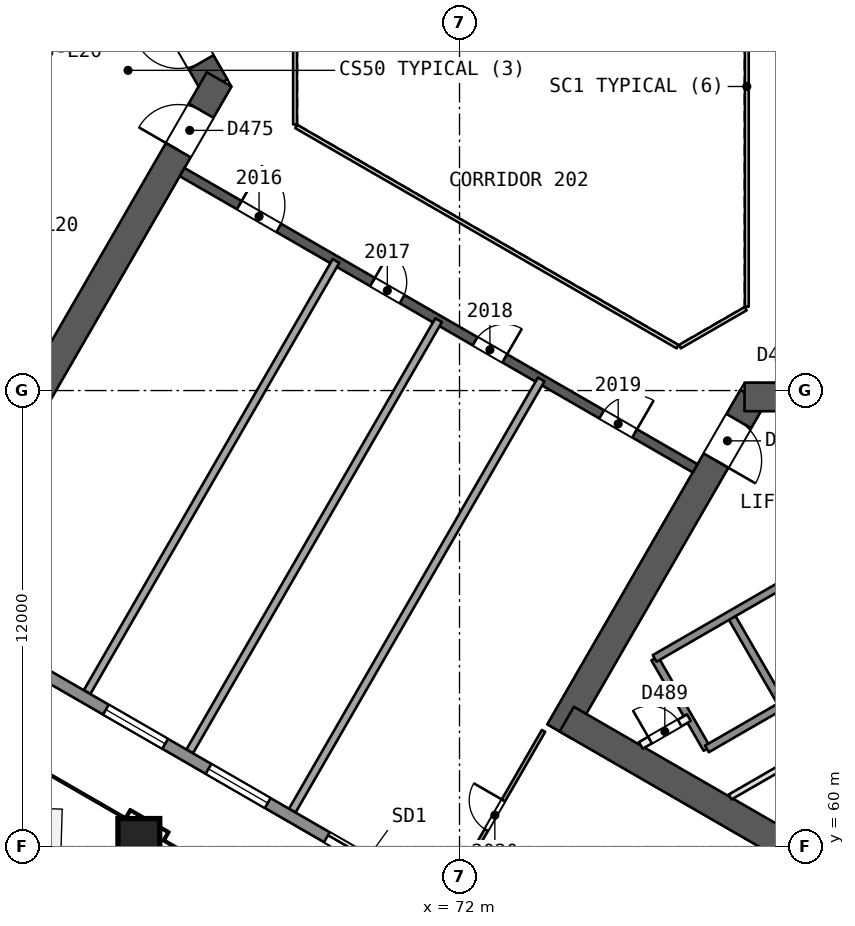
"""IFC4 building model, lengths in metres.
Left out: names, types, materials, properties, quantities, classifications, styles, units other than length and angle.
Written with IfcOpenShell. Run it as: python <this file> out.ifc"""

import sys

from ifc_helpers import new_model, si_unit, direction, frame, frame_2d, origin, origin_2d, place, context, subcontext, project, spatial, rectangle, extrude, element, fill, save


model = new_model("IFC4")
c1 = context("Model", 3, precision=1e-05, world=origin(), true_north=direction((0.0, 1.0)))
c2 = subcontext(c1, "Body", "Model", "MODEL_VIEW")
j1 = project(units=[si_unit("LENGTHUNIT", "METRE"), si_unit("PLANEANGLEUNIT", "RADIAN")], contexts=[c1])
p1 = place(None, origin())
s1 = spatial("IfcSite", under=j1, at=p1, CompositionType="ELEMENT")
p2 = place(p1, origin())
s2 = spatial("IfcBuilding", under=s1, at=p2, CompositionType="ELEMENT")
p3 = place(p2, frame((0.0, 0.0, 86.9)))
s3 = spatial("IfcBuildingStorey", under=s2, at=p3, CompositionType="ELEMENT", Elevation=86.9)
p4 = place(p3, frame((65.567, 80.0, 0.0), z_axis=(0.0, 0.0, 1.0), x_axis=(-0.499988615364, 0.866031976607, 0.0)))
e1 = element("IfcWall", 1, at=p4, inside=s3, PredefinedType="SHEAR", context=c2, shape_type="SweptSolid", body=[
    extrude(rectangle(XDim=10.163, YDim=0.75, at=frame_2d((5.082, 0.0))), origin(), (0.0, 0.0, 1.0), 3.7),
])
p5 = place(p4, frame((0.733, 0.0, 0.0)))
e2 = element("IfcOpeningElement", 2, at=p5, cuts=e1, PredefinedType="OPENING", context=c2, shape_type="SweptSolid", body=[
    extrude(rectangle(XDim=1.2, YDim=2.1, at=frame_2d((0.6, 1.05))), frame((0.0, 0.385, 0.0), z_axis=(0.0, -1.0, 0.0), x_axis=(1.0, 0.0, 0.0)), (0.0, 0.0, 1.0), 0.771),
])
p6 = place(p3, frame((60.673, 71.523, 0.0), z_axis=(0.0, 0.0, 1.0), x_axis=(0.499997052475, 0.866027105532, 0.0)))
e3 = element("IfcWall", 3, at=p6, inside=s3, PredefinedType="SHEAR", context=c2, shape_type="SweptSolid", body=[
    extrude(rectangle(XDim=10.005, YDim=0.75, at=frame_2d((5.002, 0.0))), origin(), (0.0, 0.0, 1.0), 3.7),
])
p7 = place(p6, frame((7.855, 0.0, 0.0)))
e4 = element("IfcOpeningElement", 4, at=p7, cuts=e3, PredefinedType="OPENING", context=c2, shape_type="SweptSolid", body=[
    extrude(rectangle(XDim=1.2, YDim=2.1, at=frame_2d((0.6, 1.05))), frame((0.0, 0.385, 0.0), z_axis=(0.0, -1.0, 0.0), x_axis=(1.0, 0.0, 0.0)), (0.0, 0.0, 1.0), 0.771),
])
p8 = place(p3, frame((79.717, 71.831, 0.0), z_axis=(0.0, 0.0, 1.0), x_axis=(-0.499996230114, -0.866027580318, 0.0)))
e5 = element("IfcWall", 5, at=p8, inside=s3, PredefinedType="SHEAR", context=c2, shape_type="SweptSolid", body=[
    extrude(rectangle(XDim=10.164, YDim=0.75, at=frame_2d((5.082, 0.0))), origin(), (0.0, 0.0, 1.0), 3.7),
])
p9 = place(p8, frame((0.733, 0.0, 0.0)))
e6 = element("IfcOpeningElement", 6, at=p9, cuts=e5, PredefinedType="OPENING", context=c2, shape_type="SweptSolid", body=[
    extrude(rectangle(XDim=1.2, YDim=2.1, at=frame_2d((0.6, 1.05))), frame((0.0, 0.385, 0.0), z_axis=(0.0, -1.0, 0.0), x_axis=(1.0, 0.0, 0.0)), (0.0, 0.0, 1.0), 0.771),
])
p10 = place(p3, frame((74.822, 63.354, 0.0), z_axis=(0.0, 0.0, 1.0), x_axis=(0.8660248072, -0.500001033313, 0.0)))
e7 = element("IfcWall", 7, at=p10, inside=s3, PredefinedType="SHEAR", context=c2, shape_type="SweptSolid", body=[
    extrude(rectangle(XDim=13.958, YDim=0.75, at=frame_2d((6.979, 0.0))), origin(), (0.0, 0.0, 1.0), 3.7),
])
p11 = place(p3, frame((89.505, 71.831, 0.0), z_axis=(0.0, 0.0, 1.0), x_axis=(-1.0, 0.0, 0.0)))
e8 = element("IfcWall", 8, at=p11, inside=s3, PredefinedType="SHEAR", context=c2, shape_type="SweptSolid", body=[
    extrude(rectangle(XDim=10.005, YDim=0.75, at=frame_2d((5.002, 0.0))), origin(), (0.0, 0.0, 1.0), 3.7),
])
p12 = place(p11, frame((7.855, 0.0, 0.0)))
e9 = element("IfcOpeningElement", 9, at=p12, cuts=e8, PredefinedType="OPENING", context=c2, shape_type="SweptSolid", body=[
    extrude(rectangle(XDim=1.2, YDim=2.1, at=frame_2d((0.6, 1.05))), frame((0.0, 0.385, 0.0), z_axis=(0.0, -1.0, 0.0), x_axis=(1.0, 0.0, 0.0)), (0.0, 0.0, 1.0), 0.771),
])
p13 = place(p3, frame((64.7, 77.748, 0.0), z_axis=(0.0, 0.0, 1.0), x_axis=(0.866026492143, -0.499998114903, 0.0)))
e10 = element("IfcWall", 10, at=p13, inside=s3, PredefinedType="SHEAR", context=c2, shape_type="SweptSolid", body=[
    extrude(rectangle(XDim=15.588, YDim=0.25, at=frame_2d((7.794, 0.0))), origin(), (0.0, 0.0, 1.0), 3.2),
])
p14 = place(p13, frame((1.738, 0.0, 0.0)))
e11 = element("IfcOpeningElement", 11, at=p14, cuts=e10, PredefinedType="OPENING", context=c2, shape_type="SweptSolid", body=[
    extrude(rectangle(XDim=1.2, YDim=2.4, at=frame_2d((0.6, 1.2))), frame((0.0, 0.135, 0.0), z_axis=(0.0, -1.0, 0.0), x_axis=(1.0, 0.0, 0.0)), (0.0, 0.0, 1.0), 0.271),
])
p15 = place(p13, frame((5.785, 0.0, 0.0)))
e12 = element("IfcOpeningElement", 12, at=p15, cuts=e10, PredefinedType="OPENING", context=c2, shape_type="SweptSolid", body=[
    extrude(rectangle(XDim=0.9, YDim=2.1, at=frame_2d((0.45, 1.05))), frame((0.0, 0.135, 0.0), z_axis=(0.0, -1.0, 0.0), x_axis=(1.0, 0.0, 0.0)), (0.0, 0.0, 1.0), 0.271),
])
p16 = place(p13, frame((8.903, 0.0, 0.0)))
e13 = element("IfcOpeningElement", 13, at=p16, cuts=e10, PredefinedType="OPENING", context=c2, shape_type="SweptSolid", body=[
    extrude(rectangle(XDim=0.9, YDim=2.1, at=frame_2d((0.45, 1.05))), frame((0.0, 0.135, 0.0), z_axis=(0.0, -1.0, 0.0), x_axis=(1.0, 0.0, 0.0)), (0.0, 0.0, 1.0), 0.271),
])
p17 = place(p13, frame((12.75, 0.0, 0.0)))
e14 = element("IfcOpeningElement", 14, at=p17, cuts=e10, PredefinedType="OPENING", context=c2, shape_type="SweptSolid", body=[
    extrude(rectangle(XDim=1.0, YDim=2.1, at=frame_2d((0.5, 1.05))), frame((0.0, 0.135, 0.0), z_axis=(0.0, -1.0, 0.0), x_axis=(1.0, 0.0, 0.0)), (0.0, 0.0, 1.0), 0.271),
])
p18 = place(p3, frame((63.549, 60.167, 0.0), z_axis=(0.010092954999, 0.017481261926, 0.999796248113), x_axis=(-0.499912939919, -0.865840395363, 0.020185694417)))
e15 = element("IfcColumn", 15, at=p18, inside=s3, PredefinedType="COLUMN", context=c2, shape_type="SweptSolid", body=[
    extrude(rectangle(XDim=1.1, YDim=1.1, at=origin_2d()), origin(), (0.0, 0.0, 1.0), 3.701),
])
for number, where, z_axis, x_axis in (
    (16, (62.199, 64.063, 0.0), (0.0, 0.0, 1.0), (0.5, 0.866, 0.0)),
    (17, (64.899, 62.504, 0.0), (0.0, 0.0, 1.0), (0.5, 0.866, 0.0)),
    (18, (67.599, 60.946, 0.0), (0.0, 0.0, 1.0), (0.5, 0.866, 0.0)),
):
    element("IfcWall", number, at=place(p3, frame(where, z_axis=z_axis, x_axis=x_axis)), inside=s3, PredefinedType="PARTITIONING", context=c2, shape_type="SweptSolid", body=[
        extrude(rectangle(XDim=13.102, YDim=0.2, at=frame_2d((6.551, 0.0))), origin(), (0.0, 0.0, 1.0), 3.2),
    ])
p19 = place(p3, frame((71.649, 58.607, 0.0), z_axis=(0.0, 0.0, 1.0), x_axis=(0.499972702148, 0.866041163633, 0.0)))
e19 = element("IfcWall", 19, at=p19, inside=s3, PredefinedType="PARTITIONING", context=c2, shape_type="SweptSolid", body=[
    extrude(rectangle(XDim=5.123, YDim=0.1, at=frame_2d((2.562, 0.0))), origin(), (0.0, 0.0, 1.0), 3.2),
])
p20 = place(p19, frame((2.112, 0.0, 0.0)))
e20 = element("IfcOpeningElement", 20, at=p20, cuts=e19, PredefinedType="OPENING", context=c2, shape_type="SweptSolid", body=[
    extrude(rectangle(XDim=0.9, YDim=2.1, at=frame_2d((0.45, 1.05))), frame((0.0, 0.061, 0.0), z_axis=(0.0, -1.0, 0.0), x_axis=(1.0, 0.0, 0.0)), (0.0, 0.0, 1.0), 0.121),
])
p21 = place(p3, frame((90.165, 47.745, 0.0), z_axis=(0.0, 0.0, 1.0), x_axis=(-0.866025940441, 0.499999070483, 0.0)))
e21 = element("IfcWall", 21, at=p21, inside=s3, PredefinedType="SOLIDWALL", context=c2, shape_type="SweptSolid", body=[
    extrude(rectangle(XDim=58.522, YDim=0.3, at=frame_2d((29.261, 0.0))), origin(), (0.0, 0.0, 1.0), 3.2),
])
p22 = place(p21, frame((44.294, 0.0, 0.0)))
e22 = element("IfcOpeningElement", 22, at=p22, cuts=e21, PredefinedType="OPENING", context=c2, shape_type="SweptSolid", body=[
    extrude(rectangle(XDim=2.4, YDim=2.4, at=frame_2d((1.2, 1.2))), frame((0.0, 0.161, 0.0), z_axis=(0.0, -1.0, 0.0), x_axis=(1.0, 0.0, 0.0)), (0.0, 0.0, 1.0), 0.321),
])
p23 = place(p21, frame((22.605, 0.0, 0.0)))
e23 = element("IfcOpeningElement", 23, at=p23, cuts=e21, PredefinedType="OPENING", context=c2, shape_type="SweptSolid", body=[
    extrude(rectangle(XDim=2.4, YDim=2.4, at=frame_2d((1.2, 1.2))), frame((0.0, 0.161, 0.0), z_axis=(0.0, -1.0, 0.0), x_axis=(1.0, 0.0, 0.0)), (0.0, 0.0, 1.0), 0.321),
])
p24 = place(p21, frame((10.658, 0.0, 0.0)))
e24 = element("IfcOpeningElement", 24, at=p24, cuts=e21, PredefinedType="OPENING", context=c2, shape_type="SweptSolid", body=[
    extrude(rectangle(XDim=2.4, YDim=2.4, at=frame_2d((1.2, 1.2))), frame((0.0, 0.161, 0.0), z_axis=(0.0, -1.0, 0.0), x_axis=(1.0, 0.0, 0.0)), (0.0, 0.0, 1.0), 0.321),
])
p25 = place(p21, frame((29.92, 0.0, 0.9)))
e25 = element("IfcOpeningElement", 25, at=p25, cuts=e21, PredefinedType="OPENING", context=c2, shape_type="SweptSolid", body=[
    extrude(rectangle(XDim=1.8, YDim=1.5, at=frame_2d((0.9, 0.75))), frame((0.0, 0.161, 0.0), z_axis=(0.0, -1.0, 0.0), x_axis=(1.0, 0.0, 0.0)), (0.0, 0.0, 1.0), 0.321),
])
p26 = place(p21, frame((26.802, 0.0, 0.9)))
e26 = element("IfcOpeningElement", 26, at=p26, cuts=e21, PredefinedType="OPENING", context=c2, shape_type="SweptSolid", body=[
    extrude(rectangle(XDim=1.8, YDim=1.5, at=frame_2d((0.9, 0.75))), frame((0.0, 0.161, 0.0), z_axis=(0.0, -1.0, 0.0), x_axis=(1.0, 0.0, 0.0)), (0.0, 0.0, 1.0), 0.321),
])
for number, where, z_axis, x_axis in (
    (27, (77.135, 64.952, 0.0), (0.0, 0.0, 1.0), (0.5, -0.866, 0.0)),
    (28, (79.127, 66.102, 0.0), (0.0, 0.0, 1.0), (0.5, -0.866, 0.0)),
):
    element("IfcWall", number, at=place(p3, frame(where, z_axis=z_axis, x_axis=x_axis)), inside=s3, PredefinedType="SOLIDWALL", context=c2, shape_type="SweptSolid", body=[
        extrude(rectangle(XDim=2.75, YDim=0.2, at=frame_2d((1.375, 0.0))), origin(), (0.0, 0.0, 1.0), 3.2),
    ])
p27 = place(p3, frame((77.135, 64.952, 0.0), z_axis=(0.0, 0.0, 1.0), x_axis=(0.866031916153, 0.499988720078, 0.0)))
e29 = element("IfcWall", 29, at=p27, inside=s3, PredefinedType="SOLIDWALL", context=c2, shape_type="SweptSolid", body=[
    extrude(rectangle(XDim=11.35, YDim=0.2, at=frame_2d((5.675, 0.0))), origin(), (0.0, 0.0, 1.0), 3.2),
])
p28 = place(p3, frame((76.77, 62.662, 0.0), z_axis=(0.0, 0.0, 1.0), x_axis=(0.866054810376, 0.49994906283, 0.0)))
e30 = element("IfcWall", 30, at=p28, inside=s3, PredefinedType="PARTITIONING", context=c2, shape_type="SweptSolid", body=[
    extrude(rectangle(XDim=1.461, YDim=0.2, at=frame_2d((0.73, 0.0))), origin(), (0.0, 0.0, 1.0), 3.2),
])
p29 = place(p28, frame((0.281, 0.0, 0.0)))
e31 = element("IfcOpeningElement", 31, at=p29, cuts=e30, PredefinedType="OPENING", context=c2, shape_type="SweptSolid", body=[
    extrude(rectangle(XDim=0.9, YDim=2.1, at=frame_2d((0.45, 1.05))), frame((0.0, 0.11, 0.0), z_axis=(0.0, -1.0, 0.0), x_axis=(1.0, 0.0, 0.0)), (0.0, 0.0, 1.0), 0.221),
])
p30 = place(p3, frame((80.367, 63.954, 0.0), z_axis=(0.0, 0.0, 1.0), x_axis=(0.866026575979, 0.499997969693, 0.0)))
e32 = element("IfcWall", 32, at=p30, inside=s3, PredefinedType="SOLIDWALL", context=c2, shape_type="SweptSolid", body=[
    extrude(rectangle(XDim=6.75, YDim=0.2, at=frame_2d((3.375, 0.0))), origin(), (0.0, 0.0, 1.0), 3.2),
])
p31 = place(p3, frame((78.51, 62.57, 0.0), z_axis=(0.0, 0.0, 1.0), x_axis=(0.866053019151, 0.499952165731, 0.0)))
e33 = element("IfcWall", 33, at=p31, inside=s3, PredefinedType="SOLIDWALL", context=c2, shape_type="SweptSolid", body=[
    extrude(rectangle(XDim=2.3, YDim=0.2, at=frame_2d((1.15, 0.0))), origin(), (0.0, 0.0, 1.0), 3.2),
])
p32 = place(p3, frame((79.12, 61.305, 0.0), z_axis=(0.0, 0.0, 1.0), x_axis=(0.866046471269, 0.499963508271, 0.0)))
e34 = element("IfcWall", 34, at=p32, inside=s3, PredefinedType="PARTITIONING", context=c2, shape_type="SweptSolid", body=[
    extrude(rectangle(XDim=2.28, YDim=0.15, at=frame_2d((1.14, 0.0))), origin(), (0.0, 0.0, 1.0), 3.2),
])
p33 = place(p3, frame((79.56, 74.206, 0.0), z_axis=(0.0, 0.0, 1.0), x_axis=(0.0, 1.0, 0.0)))
e35 = element("IfcWall", 35, at=p33, inside=s3, PredefinedType="PARTITIONING", context=c2, shape_type="SweptSolid", body=[
    extrude(rectangle(XDim=11.588, YDim=0.1, at=frame_2d((5.794, 0.0))), origin(), (0.0, 0.0, 1.0), 3.2),
])
p34 = place(p3, frame((67.672, 81.0, 0.0), z_axis=(0.0, 0.0, 1.0), x_axis=(0.0, -1.0, 0.0)))
e36 = element("IfcWall", 36, at=p34, inside=s3, PredefinedType="PARTITIONING", context=c2, shape_type="SweptSolid", body=[
    extrude(rectangle(XDim=2.0, YDim=0.1, at=frame_2d((1.0, 0.0))), origin(), (0.0, 0.0, 1.0), 3.2),
])
p35 = place(p3, frame((67.702, 78.948, 0.0), z_axis=(0.0, 0.0, 1.0), x_axis=(0.866026658274, -0.499997827154, 0.0)))
e37 = element("IfcWall", 37, at=p35, inside=s3, PredefinedType="PARTITIONING", context=c2, shape_type="SweptSolid", body=[
    extrude(rectangle(XDim=11.588, YDim=0.1, at=frame_2d((5.794, 0.0))), origin(), (0.0, 0.0, 1.0), 3.2),
])
p36 = place(p3, frame((77.798, 73.154, 0.0), z_axis=(0.0, 0.0, 1.0), x_axis=(0.866041268327, 0.499972520799, 0.0)))
e38 = element("IfcWall", 38, at=p36, inside=s3, PredefinedType="PARTITIONING", context=c2, shape_type="SweptSolid", body=[
    extrude(rectangle(XDim=2.0, YDim=0.1, at=frame_2d((1.0, 0.0))), origin(), (0.0, 0.0, 1.0), 3.2),
])
p37 = place(p14, origin())
e39 = element("IfcDoor", 39, at=p37, inside=s3, OperationType="SINGLE_SWING_LEFT", PredefinedType="NOTDEFINED", context=c2, shape_type="SweptSolid", body=[
    extrude(rectangle(XDim=1.2, YDim=2.4, at=frame_2d((0.6, 1.2))), frame((0.0, 0.025, 0.0), z_axis=(0.0, -1.0, 0.0), x_axis=(1.0, 0.0, 0.0)), (0.0, 0.0, 1.0), 0.05),
])
fill(e11, e39)
p38 = place(p15, origin())
e40 = element("IfcDoor", 40, at=p38, inside=s3, OperationType="SINGLE_SWING_LEFT", PredefinedType="NOTDEFINED", context=c2, shape_type="SweptSolid", body=[
    extrude(rectangle(XDim=0.9, YDim=2.1, at=frame_2d((0.45, 1.05))), frame((0.0, 0.025, 0.0), z_axis=(0.0, -1.0, 0.0), x_axis=(1.0, 0.0, 0.0)), (0.0, 0.0, 1.0), 0.05),
])
fill(e12, e40)
p39 = place(p16, origin())
e41 = element("IfcDoor", 41, at=p39, inside=s3, OperationType="SINGLE_SWING_RIGHT", PredefinedType="NOTDEFINED", context=c2, shape_type="SweptSolid", body=[
    extrude(rectangle(XDim=0.9, YDim=2.1, at=frame_2d((0.45, 1.05))), frame((0.0, 0.025, 0.0), z_axis=(0.0, -1.0, 0.0), x_axis=(1.0, 0.0, 0.0)), (0.0, 0.0, 1.0), 0.05),
])
fill(e13, e41)
p40 = place(p17, origin())
e42 = element("IfcDoor", 42, at=p40, inside=s3, OperationType="SINGLE_SWING_RIGHT", PredefinedType="NOTDEFINED", context=c2, shape_type="SweptSolid", body=[
    extrude(rectangle(XDim=1.0, YDim=2.1, at=frame_2d((0.5, 1.05))), frame((0.0, 0.025, 0.0), z_axis=(0.0, -1.0, 0.0), x_axis=(1.0, 0.0, 0.0)), (0.0, 0.0, 1.0), 0.05),
])
fill(e14, e42)
p41 = place(p20, origin())
e43 = element("IfcDoor", 43, at=p41, inside=s3, OperationType="SINGLE_SWING_RIGHT", PredefinedType="NOTDEFINED", context=c2, shape_type="SweptSolid", body=[
    extrude(rectangle(XDim=0.9, YDim=2.1, at=frame_2d((0.45, 1.05))), frame((0.0, 0.025, 0.0), z_axis=(0.0, -1.0, 0.0), x_axis=(1.0, 0.0, 0.0)), (0.0, 0.0, 1.0), 0.05),
])
fill(e20, e43)
p42 = place(p23, origin())
e44 = element("IfcDoor", 44, at=p42, inside=s3, OperationType="SLIDING_TO_RIGHT", PredefinedType="NOTDEFINED", context=c2, shape_type="SweptSolid", body=[
    extrude(rectangle(XDim=2.4, YDim=2.4, at=frame_2d((1.2, 1.2))), frame((0.0, 0.025, 0.0), z_axis=(0.0, -1.0, 0.0), x_axis=(1.0, 0.0, 0.0)), (0.0, 0.0, 1.0), 0.05),
])
fill(e23, e44)
p43 = place(p25, origin())
e45 = element("IfcWindow", 45, at=p43, inside=s3, PartitioningType="SINGLE_PANEL", PredefinedType="WINDOW", context=c2, shape_type="SweptSolid", body=[
    extrude(rectangle(XDim=1.8, YDim=1.5, at=frame_2d((0.9, 0.75))), frame((0.0, 0.03, 0.0), z_axis=(0.0, -1.0, 0.0), x_axis=(1.0, 0.0, 0.0)), (0.0, 0.0, 1.0), 0.06),
])
fill(e25, e45)
p44 = place(p26, origin())
e46 = element("IfcWindow", 46, at=p44, inside=s3, PartitioningType="SINGLE_PANEL", PredefinedType="WINDOW", context=c2, shape_type="SweptSolid", body=[
    extrude(rectangle(XDim=1.8, YDim=1.5, at=frame_2d((0.9, 0.75))), frame((0.0, 0.03, 0.0), z_axis=(0.0, -1.0, 0.0), x_axis=(1.0, 0.0, 0.0)), (0.0, 0.0, 1.0), 0.06),
])
fill(e26, e46)
p45 = place(p5, origin())
e47 = element("IfcDoor", 47, at=p45, inside=s3, OperationType="SINGLE_SWING_RIGHT", PredefinedType="NOTDEFINED", context=c2, shape_type="SweptSolid", body=[
    extrude(rectangle(XDim=1.2, YDim=2.1, at=frame_2d((0.6, 1.05))), frame((0.0, 0.025, 0.0), z_axis=(0.0, -1.0, 0.0), x_axis=(1.0, 0.0, 0.0)), (0.0, 0.0, 1.0), 0.05),
])
fill(e2, e47)
p46 = place(p7, origin())
e48 = element("IfcDoor", 48, at=p46, inside=s3, OperationType="SINGLE_SWING_LEFT", PredefinedType="NOTDEFINED", context=c2, shape_type="SweptSolid", body=[
    extrude(rectangle(XDim=1.2, YDim=2.1, at=frame_2d((0.6, 1.05))), frame((0.0, 0.025, 0.0), z_axis=(0.0, -1.0, 0.0), x_axis=(1.0, 0.0, 0.0)), (0.0, 0.0, 1.0), 0.05),
])
fill(e4, e48)
p47 = place(p9, origin())
e49 = element("IfcDoor", 49, at=p47, inside=s3, OperationType="SINGLE_SWING_RIGHT", PredefinedType="NOTDEFINED", context=c2, shape_type="SweptSolid", body=[
    extrude(rectangle(XDim=1.2, YDim=2.1, at=frame_2d((0.6, 1.05))), frame((0.0, 0.025, 0.0), z_axis=(0.0, -1.0, 0.0), x_axis=(1.0, 0.0, 0.0)), (0.0, 0.0, 1.0), 0.05),
])
fill(e6, e49)
p48 = place(p29, origin())
e50 = element("IfcDoor", 50, at=p48, inside=s3, OperationType="SINGLE_SWING_LEFT", PredefinedType="NOTDEFINED", context=c2, shape_type="SweptSolid", body=[
    extrude(rectangle(XDim=0.9, YDim=2.1, at=frame_2d((0.45, 1.05))), frame((0.0, 0.025, 0.0), z_axis=(0.0, -1.0, 0.0), x_axis=(1.0, 0.0, 0.0)), (0.0, 0.0, 1.0), 0.05),
])
fill(e31, e50)
save(model, sys.argv[1])
